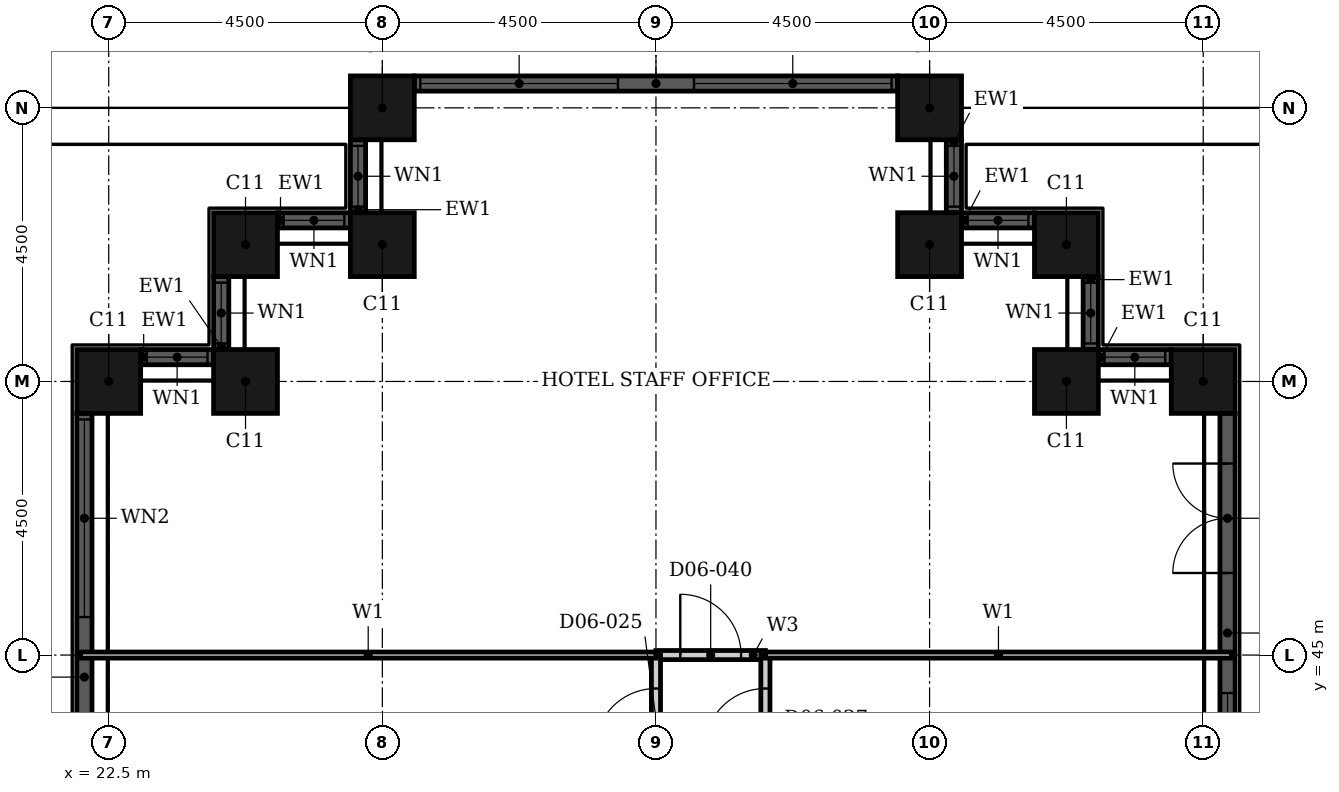
"""IFC4 building model, lengths in metres.
Left out: names, types, materials, properties, quantities, classifications, styles, units other than length and angle.
Written with IfcOpenShell. Run it as: python <this file> out.ifc"""

import sys

from ifc_helpers import new_model, si_unit, direction, frame, frame_2d, origin, origin_2d, place, context, subcontext, project, spatial, rectangle, hollow_rectangle, extrude, element, fill, save


model = new_model("IFC4")
c1 = context("Model", 3, precision=1e-05, world=origin(), true_north=direction((0.0, 1.0)))
c2 = subcontext(c1, "Body", "Model", "MODEL_VIEW")
j1 = project(units=[si_unit("LENGTHUNIT", "METRE"), si_unit("PLANEANGLEUNIT", "RADIAN")], contexts=[c1])
p1 = place(None, origin())
s1 = spatial("IfcSite", under=j1, at=p1, CompositionType="ELEMENT")
p2 = place(p1, origin())
s2 = spatial("IfcBuilding", under=s1, at=p2, CompositionType="ELEMENT")
p3 = place(p2, frame((0.0, 0.0, 33.6)))
s3 = spatial("IfcBuildingStorey", under=s2, at=p3, CompositionType="ELEMENT", Elevation=33.6)
for number, where, z_axis, x_axis in (
    (1, (40.5, 49.5, 0.0), (0.0, 0.0, 1.0), (1.0, 0.0, 0.0)),
    (2, (38.25, 49.5, 0.0), (0.0, 0.0, 1.0), (1.0, 0.0, 0.0)),
    (3, (38.25, 51.75, 0.0), (0.0, 0.0, 1.0), (1.0, 0.0, 0.0)),
    (4, (36.0, 51.75, 0.0), (0.0, 0.0, 1.0), (1.0, 0.0, 0.0)),
    (5, (36.0, 54.0, 0.0), (0.0, 0.0, 1.0), (1.0, 0.0, 0.0)),
    (6, (27.0, 54.0, 0.0), (0.0, 0.0, 1.0), (1.0, 0.0, 0.0)),
    (7, (27.0, 51.75, 0.0), (0.0, 0.0, 1.0), (1.0, 0.0, 0.0)),
    (8, (24.75, 51.75, 0.0), (0.0, 0.0, 1.0), (1.0, 0.0, 0.0)),
    (9, (24.75, 49.5, 0.0), (0.0, 0.0, 1.0), (1.0, 0.0, 0.0)),
    (10, (22.5, 49.5, 0.0), (0.0, 0.0, 1.0), (1.0, 0.0, 0.0)),
):
    element("IfcColumn", number, at=place(p3, frame(where, z_axis=z_axis, x_axis=x_axis)), inside=s3, PredefinedType="COLUMN", context=c2, shape_type="SweptSolid", body=[
        extrude(hollow_rectangle(XDim=1.05, YDim=1.05, WallThickness=0.034, at=origin_2d()), origin(), (0.0, 0.0, 1.0), 3.6),
    ])
p4 = place(p3, frame((40.9, 41.025, 0.0), z_axis=(0.0, 0.0, 1.0), x_axis=(0.0, 1.0, 0.0)))
e11 = element("IfcWall", 11, at=p4, inside=s3, PredefinedType="SOLIDWALL", context=c2, shape_type="SweptSolid", body=[
    extrude(rectangle(XDim=7.95, YDim=0.25, at=frame_2d((3.975, 0.0))), origin(), (0.0, 0.0, 1.0), 3.6),
])
p5 = place(p4, frame((0.1, 0.0, 0.9)))
e12 = element("IfcOpeningElement", 12, at=p5, cuts=e11, PredefinedType="OPENING", context=c2, shape_type="SweptSolid", body=[
    extrude(rectangle(XDim=3.25, YDim=2.08, at=frame_2d((1.625, 1.04))), frame((0.0, 0.135, 0.0), z_axis=(0.0, -1.0, 0.0), x_axis=(1.0, 0.0, 0.0)), (0.0, 0.0, 1.0), 0.27),
])
p6 = place(p4, frame((5.325, 0.0, 0.0)))
e13 = element("IfcOpeningElement", 13, at=p6, cuts=e11, PredefinedType="OPENING", context=c2, shape_type="SweptSolid", body=[
    extrude(rectangle(XDim=1.8, YDim=2.4, at=frame_2d((0.9, 1.2))), frame((0.0, 0.135, 0.0), z_axis=(0.0, -1.0, 0.0), x_axis=(1.0, 0.0, 0.0)), (0.0, 0.0, 1.0), 0.27),
])
p7 = place(p3, frame((39.975, 49.9, 0.0), z_axis=(0.0, 0.0, 1.0), x_axis=(-1.0, 0.0, 0.0)))
e14 = element("IfcWall", 14, at=p7, inside=s3, PredefinedType="SOLIDWALL", context=c2, shape_type="SweptSolid", body=[
    extrude(rectangle(XDim=1.2, YDim=0.25, at=frame_2d((0.6, 0.0))), origin(), (0.0, 0.0, 1.0), 3.6),
])
p8 = place(p7, frame((0.1, 0.0, 0.9)))
e15 = element("IfcOpeningElement", 15, at=p8, cuts=e14, PredefinedType="OPENING", context=c2, shape_type="SweptSolid", body=[
    extrude(rectangle(XDim=1.0, YDim=2.08, at=frame_2d((0.5, 1.04))), frame((0.0, 0.135, 0.0), z_axis=(0.0, -1.0, 0.0), x_axis=(1.0, 0.0, 0.0)), (0.0, 0.0, 1.0), 0.27),
])
p9 = place(p3, frame((38.65, 50.025, 0.0), z_axis=(0.0, 0.0, 1.0), x_axis=(0.0, 1.0, 0.0)))
e16 = element("IfcWall", 16, at=p9, inside=s3, PredefinedType="SOLIDWALL", context=c2, shape_type="SweptSolid", body=[
    extrude(rectangle(XDim=1.2, YDim=0.25, at=frame_2d((0.6, 0.0))), origin(), (0.0, 0.0, 1.0), 3.6),
])
p10 = place(p9, frame((0.1, 0.0, 0.9)))
e17 = element("IfcOpeningElement", 17, at=p10, cuts=e16, PredefinedType="OPENING", context=c2, shape_type="SweptSolid", body=[
    extrude(rectangle(XDim=1.0, YDim=2.08, at=frame_2d((0.5, 1.04))), frame((0.0, 0.135, 0.0), z_axis=(0.0, -1.0, 0.0), x_axis=(1.0, 0.0, 0.0)), (0.0, 0.0, 1.0), 0.27),
])
p11 = place(p3, frame((37.725, 52.15, 0.0), z_axis=(0.0, 0.0, 1.0), x_axis=(-1.0, 0.0, 0.0)))
e18 = element("IfcWall", 18, at=p11, inside=s3, PredefinedType="SOLIDWALL", context=c2, shape_type="SweptSolid", body=[
    extrude(rectangle(XDim=1.2, YDim=0.25, at=frame_2d((0.6, 0.0))), origin(), (0.0, 0.0, 1.0), 3.6),
])
p12 = place(p11, frame((0.1, 0.0, 0.9)))
e19 = element("IfcOpeningElement", 19, at=p12, cuts=e18, PredefinedType="OPENING", context=c2, shape_type="SweptSolid", body=[
    extrude(rectangle(XDim=1.0, YDim=2.08, at=frame_2d((0.5, 1.04))), frame((0.0, 0.135, 0.0), z_axis=(0.0, -1.0, 0.0), x_axis=(1.0, 0.0, 0.0)), (0.0, 0.0, 1.0), 0.27),
])
p13 = place(p3, frame((36.4, 52.275, 0.0), z_axis=(0.0, 0.0, 1.0), x_axis=(0.0, 1.0, 0.0)))
e20 = element("IfcWall", 20, at=p13, inside=s3, PredefinedType="SOLIDWALL", context=c2, shape_type="SweptSolid", body=[
    extrude(rectangle(XDim=1.2, YDim=0.25, at=frame_2d((0.6, 0.0))), origin(), (0.0, 0.0, 1.0), 3.6),
])
p14 = place(p13, frame((0.1, 0.0, 0.9)))
e21 = element("IfcOpeningElement", 21, at=p14, cuts=e20, PredefinedType="OPENING", context=c2, shape_type="SweptSolid", body=[
    extrude(rectangle(XDim=1.0, YDim=2.08, at=frame_2d((0.5, 1.04))), frame((0.0, 0.135, 0.0), z_axis=(0.0, -1.0, 0.0), x_axis=(1.0, 0.0, 0.0)), (0.0, 0.0, 1.0), 0.27),
])
p15 = place(p3, frame((35.475, 54.4, 0.0), z_axis=(0.0, 0.0, 1.0), x_axis=(-1.0, 0.0, 0.0)))
e22 = element("IfcWall", 22, at=p15, inside=s3, PredefinedType="SOLIDWALL", context=c2, shape_type="SweptSolid", body=[
    extrude(rectangle(XDim=7.95, YDim=0.25, at=frame_2d((3.975, 0.0))), origin(), (0.0, 0.0, 1.0), 3.6),
])
p16 = place(p15, frame((0.1, 0.0, 0.9)))
e23 = element("IfcOpeningElement", 23, at=p16, cuts=e22, PredefinedType="OPENING", context=c2, shape_type="SweptSolid", body=[
    extrude(rectangle(XDim=3.25, YDim=2.08, at=frame_2d((1.625, 1.04))), frame((0.0, 0.135, 0.0), z_axis=(0.0, -1.0, 0.0), x_axis=(1.0, 0.0, 0.0)), (0.0, 0.0, 1.0), 0.27),
])
p17 = place(p15, frame((4.6, 0.0, 0.9)))
e24 = element("IfcOpeningElement", 24, at=p17, cuts=e22, PredefinedType="OPENING", context=c2, shape_type="SweptSolid", body=[
    extrude(rectangle(XDim=3.25, YDim=2.08, at=frame_2d((1.625, 1.04))), frame((0.0, 0.135, 0.0), z_axis=(0.0, -1.0, 0.0), x_axis=(1.0, 0.0, 0.0)), (0.0, 0.0, 1.0), 0.27),
])
p18 = place(p3, frame((26.6, 53.475, 0.0), z_axis=(0.0, 0.0, 1.0), x_axis=(0.0, -1.0, 0.0)))
e25 = element("IfcWall", 25, at=p18, inside=s3, PredefinedType="SOLIDWALL", context=c2, shape_type="SweptSolid", body=[
    extrude(rectangle(XDim=1.2, YDim=0.25, at=frame_2d((0.6, 0.0))), origin(), (0.0, 0.0, 1.0), 3.6),
])
p19 = place(p18, frame((0.1, 0.0, 0.9)))
e26 = element("IfcOpeningElement", 26, at=p19, cuts=e25, PredefinedType="OPENING", context=c2, shape_type="SweptSolid", body=[
    extrude(rectangle(XDim=1.0, YDim=2.08, at=frame_2d((0.5, 1.04))), frame((0.0, 0.135, 0.0), z_axis=(0.0, -1.0, 0.0), x_axis=(1.0, 0.0, 0.0)), (0.0, 0.0, 1.0), 0.27),
])
p20 = place(p3, frame((26.475, 52.15, 0.0), z_axis=(0.0, 0.0, 1.0), x_axis=(-1.0, 0.0, 0.0)))
e27 = element("IfcWall", 27, at=p20, inside=s3, PredefinedType="SOLIDWALL", context=c2, shape_type="SweptSolid", body=[
    extrude(rectangle(XDim=1.2, YDim=0.25, at=frame_2d((0.6, 0.0))), origin(), (0.0, 0.0, 1.0), 3.6),
])
p21 = place(p20, frame((0.1, 0.0, 0.9)))
e28 = element("IfcOpeningElement", 28, at=p21, cuts=e27, PredefinedType="OPENING", context=c2, shape_type="SweptSolid", body=[
    extrude(rectangle(XDim=1.0, YDim=2.08, at=frame_2d((0.5, 1.04))), frame((0.0, 0.135, 0.0), z_axis=(0.0, -1.0, 0.0), x_axis=(1.0, 0.0, 0.0)), (0.0, 0.0, 1.0), 0.27),
])
p22 = place(p3, frame((24.35, 51.225, 0.0), z_axis=(0.0, 0.0, 1.0), x_axis=(0.0, -1.0, 0.0)))
e29 = element("IfcWall", 29, at=p22, inside=s3, PredefinedType="SOLIDWALL", context=c2, shape_type="SweptSolid", body=[
    extrude(rectangle(XDim=1.2, YDim=0.25, at=frame_2d((0.6, 0.0))), origin(), (0.0, 0.0, 1.0), 3.6),
])
p23 = place(p22, frame((0.1, 0.0, 0.9)))
e30 = element("IfcOpeningElement", 30, at=p23, cuts=e29, PredefinedType="OPENING", context=c2, shape_type="SweptSolid", body=[
    extrude(rectangle(XDim=1.0, YDim=2.08, at=frame_2d((0.5, 1.04))), frame((0.0, 0.135, 0.0), z_axis=(0.0, -1.0, 0.0), x_axis=(1.0, 0.0, 0.0)), (0.0, 0.0, 1.0), 0.27),
])
p24 = place(p3, frame((24.225, 49.9, 0.0), z_axis=(0.0, 0.0, 1.0), x_axis=(-1.0, 0.0, 0.0)))
e31 = element("IfcWall", 31, at=p24, inside=s3, PredefinedType="SOLIDWALL", context=c2, shape_type="SweptSolid", body=[
    extrude(rectangle(XDim=1.2, YDim=0.25, at=frame_2d((0.6, 0.0))), origin(), (0.0, 0.0, 1.0), 3.6),
])
p25 = place(p24, frame((0.1, 0.0, 0.9)))
e32 = element("IfcOpeningElement", 32, at=p25, cuts=e31, PredefinedType="OPENING", context=c2, shape_type="SweptSolid", body=[
    extrude(rectangle(XDim=1.0, YDim=2.08, at=frame_2d((0.5, 1.04))), frame((0.0, 0.135, 0.0), z_axis=(0.0, -1.0, 0.0), x_axis=(1.0, 0.0, 0.0)), (0.0, 0.0, 1.0), 0.27),
])
p26 = place(p3, frame((22.1, 48.975, 0.0), z_axis=(0.0, 0.0, 1.0), x_axis=(0.0, -1.0, 0.0)))
e33 = element("IfcWall", 33, at=p26, inside=s3, PredefinedType="SOLIDWALL", context=c2, shape_type="SweptSolid", body=[
    extrude(rectangle(XDim=7.95, YDim=0.25, at=frame_2d((3.975, 0.0))), origin(), (0.0, 0.0, 1.0), 3.6),
])
p27 = place(p26, frame((0.1, 0.0, 0.9)))
e34 = element("IfcOpeningElement", 34, at=p27, cuts=e33, PredefinedType="OPENING", context=c2, shape_type="SweptSolid", body=[
    extrude(rectangle(XDim=3.25, YDim=2.08, at=frame_2d((1.625, 1.04))), frame((0.0, 0.135, 0.0), z_axis=(0.0, -1.0, 0.0), x_axis=(1.0, 0.0, 0.0)), (0.0, 0.0, 1.0), 0.27),
])
p28 = place(p26, frame((5.325, 0.0, 0.0)))
e35 = element("IfcOpeningElement", 35, at=p28, cuts=e33, PredefinedType="OPENING", context=c2, shape_type="SweptSolid", body=[
    extrude(rectangle(XDim=1.8, YDim=2.4, at=frame_2d((0.9, 1.2))), frame((0.0, 0.135, 0.0), z_axis=(0.0, -1.0, 0.0), x_axis=(1.0, 0.0, 0.0)), (0.0, 0.0, 1.0), 0.27),
])
p29 = place(p3, frame((31.5, 45.0, 0.0), z_axis=(0.0, 0.0, 1.0), x_axis=(1.0, 0.0, 0.0)))
e36 = element("IfcWall", 36, at=p29, inside=s3, PredefinedType="PARTITIONING", context=c2, shape_type="SweptSolid", body=[
    extrude(rectangle(XDim=1.8, YDim=0.15, at=frame_2d((0.9, 0.0))), origin(), (0.0, 0.0, 1.0), 3.3),
])
p30 = place(p29, frame((0.4, 0.0, 0.0)))
e37 = element("IfcOpeningElement", 37, at=p30, cuts=e36, PredefinedType="OPENING", context=c2, shape_type="SweptSolid", body=[
    extrude(rectangle(XDim=1.0, YDim=2.1, at=frame_2d((0.5, 1.05))), frame((0.0, 0.085, 0.0), z_axis=(0.0, -1.0, 0.0), x_axis=(1.0, 0.0, 0.0)), (0.0, 0.0, 1.0), 0.17),
])
p31 = place(p3, frame((31.5, 33.3, 0.0), z_axis=(0.0, 0.0, 1.0), x_axis=(0.0, 1.0, 0.0)))
e38 = element("IfcWall", 38, at=p31, inside=s3, PredefinedType="PARTITIONING", context=c2, shape_type="SweptSolid", body=[
    extrude(rectangle(XDim=11.7, YDim=0.15, at=frame_2d((5.85, 0.0))), origin(), (0.0, 0.0, 1.0), 2.58),
])
p32 = place(p31, frame((10.15, 0.0, 0.0)))
e39 = element("IfcOpeningElement", 39, at=p32, cuts=e38, PredefinedType="OPENING", context=c2, shape_type="SweptSolid", body=[
    extrude(rectangle(XDim=1.0, YDim=2.1, at=frame_2d((0.5, 1.05))), frame((0.0, 0.085, 0.0), z_axis=(0.0, -1.0, 0.0), x_axis=(1.0, 0.0, 0.0)), (0.0, 0.0, 1.0), 0.17),
])
p33 = place(p3, frame((33.3, 33.3, 0.0), z_axis=(0.0, 0.0, 1.0), x_axis=(0.0, 1.0, 0.0)))
e40 = element("IfcWall", 40, at=p33, inside=s3, PredefinedType="PARTITIONING", context=c2, shape_type="SweptSolid", body=[
    extrude(rectangle(XDim=11.7, YDim=0.15, at=frame_2d((5.85, 0.0))), origin(), (0.0, 0.0, 1.0), 3.3),
])
p34 = place(p33, frame((10.15, 0.0, 0.0)))
e41 = element("IfcOpeningElement", 41, at=p34, cuts=e40, PredefinedType="OPENING", context=c2, shape_type="SweptSolid", body=[
    extrude(rectangle(XDim=1.0, YDim=2.1, at=frame_2d((0.5, 1.05))), frame((0.0, 0.085, 0.0), z_axis=(0.0, -1.0, 0.0), x_axis=(1.0, 0.0, 0.0)), (0.0, 0.0, 1.0), 0.17),
])
p35 = place(p3, frame((33.3, 45.0, 0.0), z_axis=(0.0, 0.0, 1.0), x_axis=(1.0, 0.0, 0.0)))
e42 = element("IfcWall", 42, at=p35, inside=s3, PredefinedType="PARTITIONING", context=c2, shape_type="SweptSolid", body=[
    extrude(rectangle(XDim=7.665, YDim=0.1, at=frame_2d((3.833, 0.0))), origin(), (0.0, 0.0, 1.0), 3.3),
])
p36 = place(p3, frame((22.035, 45.0, 0.0), z_axis=(0.0, 0.0, 1.0), x_axis=(1.0, 0.0, 0.0)))
e43 = element("IfcWall", 43, at=p36, inside=s3, PredefinedType="PARTITIONING", context=c2, shape_type="SweptSolid", body=[
    extrude(rectangle(XDim=9.465, YDim=0.1, at=frame_2d((4.732, 0.0))), origin(), (0.0, 0.0, 1.0), 3.3),
])
p37 = place(p5, origin())
e44 = element("IfcWindow", 44, at=p37, inside=s3, PartitioningType="SINGLE_PANEL", PredefinedType="WINDOW", context=c2, shape_type="SweptSolid", body=[
    extrude(rectangle(XDim=3.25, YDim=2.08, at=frame_2d((1.625, 1.04))), frame((0.0, 0.03, 0.0), z_axis=(0.0, -1.0, 0.0), x_axis=(1.0, 0.0, 0.0)), (0.0, 0.0, 1.0), 0.06),
])
fill(e12, e44)
p38 = place(p6, origin())
e45 = element("IfcDoor", 45, at=p38, inside=s3, OperationType="DOUBLE_DOOR_SINGLE_SWING", PredefinedType="DOOR", context=c2, shape_type="SweptSolid", body=[
    extrude(rectangle(XDim=1.8, YDim=2.4, at=frame_2d((0.9, 1.2))), frame((0.0, 0.025, 0.0), z_axis=(0.0, -1.0, 0.0), x_axis=(1.0, 0.0, 0.0)), (0.0, 0.0, 1.0), 0.05),
])
fill(e13, e45)
p39 = place(p8, origin())
e46 = element("IfcWindow", 46, at=p39, inside=s3, PartitioningType="SINGLE_PANEL", PredefinedType="WINDOW", context=c2, shape_type="SweptSolid", body=[
    extrude(rectangle(XDim=1.0, YDim=2.08, at=frame_2d((0.5, 1.04))), frame((0.0, 0.03, 0.0), z_axis=(0.0, -1.0, 0.0), x_axis=(1.0, 0.0, 0.0)), (0.0, 0.0, 1.0), 0.06),
])
fill(e15, e46)
p40 = place(p10, origin())
e47 = element("IfcWindow", 47, at=p40, inside=s3, PartitioningType="SINGLE_PANEL", PredefinedType="WINDOW", context=c2, shape_type="SweptSolid", body=[
    extrude(rectangle(XDim=1.0, YDim=2.08, at=frame_2d((0.5, 1.04))), frame((0.0, 0.03, 0.0), z_axis=(0.0, -1.0, 0.0), x_axis=(1.0, 0.0, 0.0)), (0.0, 0.0, 1.0), 0.06),
])
fill(e17, e47)
p41 = place(p12, origin())
e48 = element("IfcWindow", 48, at=p41, inside=s3, PartitioningType="SINGLE_PANEL", PredefinedType="WINDOW", context=c2, shape_type="SweptSolid", body=[
    extrude(rectangle(XDim=1.0, YDim=2.08, at=frame_2d((0.5, 1.04))), frame((0.0, 0.03, 0.0), z_axis=(0.0, -1.0, 0.0), x_axis=(1.0, 0.0, 0.0)), (0.0, 0.0, 1.0), 0.06),
])
fill(e19, e48)
p42 = place(p14, origin())
e49 = element("IfcWindow", 49, at=p42, inside=s3, PartitioningType="SINGLE_PANEL", PredefinedType="WINDOW", context=c2, shape_type="SweptSolid", body=[
    extrude(rectangle(XDim=1.0, YDim=2.08, at=frame_2d((0.5, 1.04))), frame((0.0, 0.03, 0.0), z_axis=(0.0, -1.0, 0.0), x_axis=(1.0, 0.0, 0.0)), (0.0, 0.0, 1.0), 0.06),
])
fill(e21, e49)
p43 = place(p16, origin())
e50 = element("IfcWindow", 50, at=p43, inside=s3, PartitioningType="SINGLE_PANEL", PredefinedType="WINDOW", context=c2, shape_type="SweptSolid", body=[
    extrude(rectangle(XDim=3.25, YDim=2.08, at=frame_2d((1.625, 1.04))), frame((0.0, 0.03, 0.0), z_axis=(0.0, -1.0, 0.0), x_axis=(1.0, 0.0, 0.0)), (0.0, 0.0, 1.0), 0.06),
])
fill(e23, e50)
p44 = place(p17, origin())
e51 = element("IfcWindow", 51, at=p44, inside=s3, PartitioningType="SINGLE_PANEL", PredefinedType="WINDOW", context=c2, shape_type="SweptSolid", body=[
    extrude(rectangle(XDim=3.25, YDim=2.08, at=frame_2d((1.625, 1.04))), frame((0.0, 0.03, 0.0), z_axis=(0.0, -1.0, 0.0), x_axis=(1.0, 0.0, 0.0)), (0.0, 0.0, 1.0), 0.06),
])
fill(e24, e51)
p45 = place(p19, origin())
e52 = element("IfcWindow", 52, at=p45, inside=s3, PartitioningType="SINGLE_PANEL", PredefinedType="WINDOW", context=c2, shape_type="SweptSolid", body=[
    extrude(rectangle(XDim=1.0, YDim=2.08, at=frame_2d((0.5, 1.04))), frame((0.0, 0.03, 0.0), z_axis=(0.0, -1.0, 0.0), x_axis=(1.0, 0.0, 0.0)), (0.0, 0.0, 1.0), 0.06),
])
fill(e26, e52)
p46 = place(p21, origin())
e53 = element("IfcWindow", 53, at=p46, inside=s3, PartitioningType="SINGLE_PANEL", PredefinedType="WINDOW", context=c2, shape_type="SweptSolid", body=[
    extrude(rectangle(XDim=1.0, YDim=2.08, at=frame_2d((0.5, 1.04))), frame((0.0, 0.03, 0.0), z_axis=(0.0, -1.0, 0.0), x_axis=(1.0, 0.0, 0.0)), (0.0, 0.0, 1.0), 0.06),
])
fill(e28, e53)
p47 = place(p23, origin())
e54 = element("IfcWindow", 54, at=p47, inside=s3, PartitioningType="SINGLE_PANEL", PredefinedType="WINDOW", context=c2, shape_type="SweptSolid", body=[
    extrude(rectangle(XDim=1.0, YDim=2.08, at=frame_2d((0.5, 1.04))), frame((0.0, 0.03, 0.0), z_axis=(0.0, -1.0, 0.0), x_axis=(1.0, 0.0, 0.0)), (0.0, 0.0, 1.0), 0.06),
])
fill(e30, e54)
p48 = place(p25, origin())
e55 = element("IfcWindow", 55, at=p48, inside=s3, PartitioningType="SINGLE_PANEL", PredefinedType="WINDOW", context=c2, shape_type="SweptSolid", body=[
    extrude(rectangle(XDim=1.0, YDim=2.08, at=frame_2d((0.5, 1.04))), frame((0.0, 0.03, 0.0), z_axis=(0.0, -1.0, 0.0), x_axis=(1.0, 0.0, 0.0)), (0.0, 0.0, 1.0), 0.06),
])
fill(e32, e55)
p49 = place(p27, origin())
e56 = element("IfcWindow", 56, at=p49, inside=s3, PartitioningType="SINGLE_PANEL", PredefinedType="WINDOW", context=c2, shape_type="SweptSolid", body=[
    extrude(rectangle(XDim=3.25, YDim=2.08, at=frame_2d((1.625, 1.04))), frame((0.0, 0.03, 0.0), z_axis=(0.0, -1.0, 0.0), x_axis=(1.0, 0.0, 0.0)), (0.0, 0.0, 1.0), 0.06),
])
fill(e34, e56)
p50 = place(p32, origin())
e57 = element("IfcDoor", 57, at=p50, inside=s3, OperationType="SINGLE_SWING_RIGHT", PredefinedType="DOOR", context=c2, shape_type="SweptSolid", body=[
    extrude(rectangle(XDim=1.0, YDim=2.1, at=frame_2d((0.5, 1.05))), frame((0.0, 0.025, 0.0), z_axis=(0.0, -1.0, 0.0), x_axis=(1.0, 0.0, 0.0)), (0.0, 0.0, 1.0), 0.05),
])
fill(e39, e57)
p51 = place(p34, origin())
e58 = element("IfcDoor", 58, at=p51, inside=s3, OperationType="SINGLE_SWING_RIGHT", PredefinedType="DOOR", context=c2, shape_type="SweptSolid", body=[
    extrude(rectangle(XDim=1.0, YDim=2.1, at=frame_2d((0.5, 1.05))), frame((0.0, 0.025, 0.0), z_axis=(0.0, -1.0, 0.0), x_axis=(1.0, 0.0, 0.0)), (0.0, 0.0, 1.0), 0.05),
])
fill(e41, e58)
p52 = place(p30, origin())
e59 = element("IfcDoor", 59, at=p52, inside=s3, OperationType="SINGLE_SWING_LEFT", PredefinedType="DOOR", context=c2, shape_type="SweptSolid", body=[
    extrude(rectangle(XDim=1.0, YDim=2.1, at=frame_2d((0.5, 1.05))), frame((0.0, 0.025, 0.0), z_axis=(0.0, -1.0, 0.0), x_axis=(1.0, 0.0, 0.0)), (0.0, 0.0, 1.0), 0.05),
])
fill(e37, e59)
save(model, sys.argv[1])
